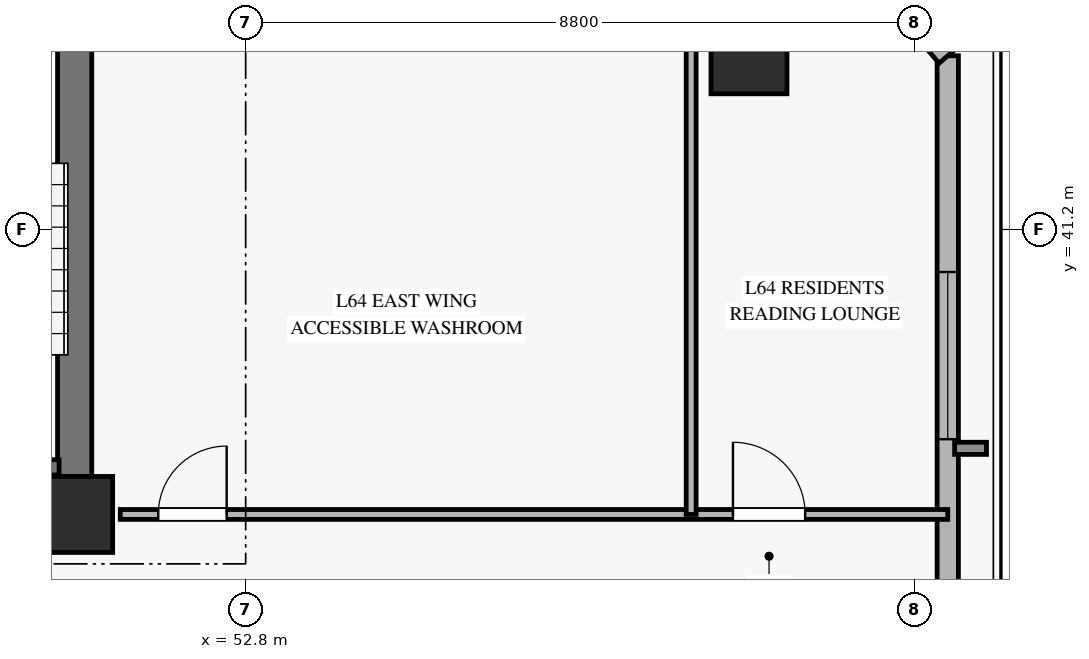
"""IFC4 building model, lengths in metres.
Left out: names, types, materials, properties, quantities, classifications, styles, units other than length and angle.
Written with IfcOpenShell. Run it as: python <this file> out.ifc"""

import sys

from ifc_helpers import new_model, si_unit, direction, frame, frame_2d, origin, origin_2d, place, context, subcontext, project, spatial, rectangle, hollow_rectangle, extrude, source, transform, mapped, element, fill, save


model = new_model("IFC4")
c1 = context("Model", 3, precision=1e-05, world=origin(), true_north=direction((0.0, 1.0)))
c2 = subcontext(c1, "Body", "Model", "MODEL_VIEW")
j1 = project(units=[si_unit("LENGTHUNIT", "METRE"), si_unit("PLANEANGLEUNIT", "RADIAN")], contexts=[c1])
p1 = place(None, origin())
s1 = spatial("IfcSite", under=j1, at=p1, CompositionType="ELEMENT")
p2 = place(p1, origin())
s2 = spatial("IfcBuilding", under=s1, at=p2, CompositionType="ELEMENT")
p3 = place(p2, frame((0.0, 0.0, 251.9)))
s3 = spatial("IfcBuildingStorey", under=s2, at=p3, CompositionType="ELEMENT", Elevation=251.9)
m1 = source(origin(), c2, "Body", "SweptSolid", [
    extrude(rectangle(XDim=1.0, YDim=1.0, at=origin_2d()), origin(), (0.0, 0.0, 1.0), 3.185),
])
p4 = place(p3, frame((50.55, 37.45, 0.0), z_axis=(0.0, 0.0, 1.0), x_axis=(1.0, 0.0, 0.0)))
e1 = element("IfcColumn", 1, at=p4, inside=s3, PredefinedType="PILASTER", context=c2, shape_type="MappedRepresentation", body=[
    mapped(m1, transform((0.0, 0.0, 0.0), x_axis=(1.0, 0.0, 0.0), y_axis=(0.0, 1.0, 0.0), z_axis=(0.0, 0.0, 1.0), scale=1.0)),
])
p5 = place(p3, frame((50.55, 37.95, 0.0), z_axis=(0.0, 0.0, 1.0), x_axis=(0.0, 1.0, 0.0)))
e2 = element("IfcWall", 2, at=p5, inside=s3, PredefinedType="SHEAR", context=c2, shape_type="SweptSolid", body=[
    extrude(rectangle(XDim=8.1, YDim=0.45, at=frame_2d((4.05, 0.0))), origin(), (0.0, 0.0, 1.0), 3.185),
])
m2 = source(origin(), c2, "Body", "SweptSolid", [
    extrude(hollow_rectangle(XDim=1.0, YDim=1.0, WallThickness=0.045, at=origin_2d()), origin(), (0.0, 0.0, 1.0), 3.185),
])
p6 = place(p3, frame((59.422, 43.485, 0.0), z_axis=(0.0, 0.0, 1.0), x_axis=(1.0, 0.0, 0.0)))
e3 = element("IfcColumn", 3, at=p6, inside=s3, PredefinedType="COLUMN", context=c2, shape_type="MappedRepresentation", body=[
    mapped(m2, transform((0.0, 0.0, 0.0), x_axis=(1.0, 0.0, 0.0), y_axis=(0.0, 1.0, 0.0), z_axis=(0.0, 0.0, 1.0), scale=1.0)),
])
p7 = place(p3, frame((62.037, 30.857, 0.0), z_axis=(0.0, 0.0, 1.0), x_axis=(0.0, 1.0, 0.0)))
e4 = element("IfcWall", 4, at=p7, inside=s3, PredefinedType="SOLIDWALL", context=c2, shape_type="SweptSolid", body=[
    extrude(rectangle(XDim=12.628, YDim=0.28, at=frame_2d((6.314, 0.0))), origin(), (0.0, 0.0, 1.0), 2.815),
])
p8 = place(p7, frame((7.583, 0.0, 0.45)))
e5 = element("IfcOpeningElement", 5, at=p8, cuts=e4, PredefinedType="OPENING", context=c2, shape_type="SweptSolid", body=[
    extrude(rectangle(XDim=2.2, YDim=2.1, at=frame_2d((1.1, 1.05))), frame((0.0, 0.15, 0.0), z_axis=(0.0, -1.0, 0.0), x_axis=(1.0, 0.0, 0.0)), (0.0, 0.0, 1.0), 0.3),
])
p9 = place(p3, frame((62.037, 43.485, 0.0), z_axis=(0.0, 0.0, 1.0), x_axis=(-0.65001186438, 0.759924059472, 0.0)))
e6 = element("IfcWall", 6, at=p9, inside=s3, PredefinedType="SOLIDWALL", context=c2, shape_type="SweptSolid", body=[
    extrude(rectangle(XDim=3.638, YDim=0.3, at=frame_2d((1.819, 0.0))), origin(), (0.0, 0.0, 1.0), 2.815),
])
p10 = place(p9, frame((1.019, 0.0, 0.45)))
e7 = element("IfcOpeningElement", 7, at=p10, cuts=e6, PredefinedType="OPENING", context=c2, shape_type="SweptSolid", body=[
    extrude(rectangle(XDim=1.6, YDim=2.0, at=frame_2d((0.8, 1.0))), frame((0.0, 0.16, 0.0), z_axis=(0.0, -1.0, 0.0), x_axis=(1.0, 0.0, 0.0)), (0.0, 0.0, 1.0), 0.32),
])
p11 = place(p3, frame((47.44, 38.07, 0.0), z_axis=(0.0, 0.0, 1.0), x_axis=(1.0, 0.0, 0.0)))
e8 = element("IfcWall", 8, at=p11, inside=s3, PredefinedType="SOLIDWALL", context=c2, shape_type="SweptSolid", body=[
    extrude(rectangle(XDim=2.905, YDim=0.2, at=frame_2d((1.453, 0.0))), origin(), (0.0, 0.0, 1.0), 3.4),
])
p12 = place(p3, frame((51.15, 37.45, 0.0), z_axis=(0.0, 0.0, 1.0), x_axis=(1.0, 0.0, 0.0)))
e9 = element("IfcWall", 9, at=p12, inside=s3, PredefinedType="PARTITIONING", context=c2, shape_type="SweptSolid", body=[
    extrude(rectangle(XDim=10.887, YDim=0.13, at=frame_2d((5.444, 0.0))), origin(), (0.0, 0.0, 1.0), 2.82),
])
p13 = place(p12, frame((0.5, 0.0, 0.0)))
e10 = element("IfcOpeningElement", 10, at=p13, cuts=e9, PredefinedType="OPENING", context=c2, shape_type="SweptSolid", body=[
    extrude(rectangle(XDim=0.9, YDim=2.1, at=frame_2d((0.45, 1.05))), frame((0.0, 0.075, 0.0), z_axis=(0.0, -1.0, 0.0), x_axis=(1.0, 0.0, 0.0)), (0.0, 0.0, 1.0), 0.15),
])
p14 = place(p12, frame((8.061, 0.0, 0.0)))
e11 = element("IfcOpeningElement", 11, at=p14, cuts=e9, PredefinedType="OPENING", context=c2, shape_type="SweptSolid", body=[
    extrude(rectangle(XDim=0.95, YDim=2.1, at=frame_2d((0.475, 1.05))), frame((0.0, 0.075, 0.0), z_axis=(0.0, -1.0, 0.0), x_axis=(1.0, 0.0, 0.0)), (0.0, 0.0, 1.0), 0.15),
])
p15 = place(p3, frame((58.661, 37.45, 0.0), z_axis=(0.0, 0.0, 1.0), x_axis=(0.0, 1.0, 0.0)))
e12 = element("IfcWall", 12, at=p15, inside=s3, PredefinedType="PARTITIONING", context=c2, shape_type="SweptSolid", body=[
    extrude(rectangle(XDim=8.8, YDim=0.13, at=frame_2d((4.4, 0.0))), origin(), (0.0, 0.0, 1.0), 3.185),
])
m3 = source(origin(), c2, "Body", "SweptSolid", [
    extrude(rectangle(XDim=2.2, YDim=2.1, at=frame_2d((1.1, 1.05))), frame((0.0, 0.03, 0.0), z_axis=(0.0, -1.0, 0.0), x_axis=(1.0, 0.0, 0.0)), (0.0, 0.0, 1.0), 0.06),
])
p16 = place(p8, origin())
e13 = element("IfcWindow", 13, at=p16, inside=s3, PartitioningType="SINGLE_PANEL", PredefinedType="WINDOW", context=c2, shape_type="MappedRepresentation", body=[
    mapped(m3, transform((0.0, 0.0, 0.0), x_axis=(1.0, 0.0, 0.0), y_axis=(0.0, 1.0, 0.0), z_axis=(0.0, 0.0, 1.0), scale=1.0)),
])
fill(e5, e13)
m4 = source(origin(), c2, "Body", "SweptSolid", [
    extrude(rectangle(XDim=0.9, YDim=2.1, at=frame_2d((0.45, 1.05))), frame((0.0, 0.025, 0.0), z_axis=(0.0, -1.0, 0.0), x_axis=(1.0, 0.0, 0.0)), (0.0, 0.0, 1.0), 0.05),
])
p17 = place(p13, origin())
e14 = element("IfcDoor", 14, at=p17, inside=s3, OperationType="SINGLE_SWING_RIGHT", PredefinedType="DOOR", context=c2, shape_type="MappedRepresentation", body=[
    mapped(m4, transform((0.0, 0.0, 0.0), x_axis=(1.0, 0.0, 0.0), y_axis=(0.0, 1.0, 0.0), z_axis=(0.0, 0.0, 1.0), scale=1.0)),
])
fill(e10, e14)
m5 = source(origin(), c2, "Body", "SweptSolid", [
    extrude(rectangle(XDim=0.95, YDim=2.1, at=frame_2d((0.475, 1.05))), frame((0.0, 0.025, 0.0), z_axis=(0.0, -1.0, 0.0), x_axis=(1.0, 0.0, 0.0)), (0.0, 0.0, 1.0), 0.05),
])
p18 = place(p14, origin())
e15 = element("IfcDoor", 15, at=p18, inside=s3, OperationType="SINGLE_SWING_LEFT", PredefinedType="DOOR", context=c2, shape_type="MappedRepresentation", body=[
    mapped(m5, transform((0.0, 0.0, 0.0), x_axis=(1.0, 0.0, 0.0), y_axis=(0.0, 1.0, 0.0), z_axis=(0.0, 0.0, 1.0), scale=1.0)),
])
fill(e11, e15)
save(model, sys.argv[1])
